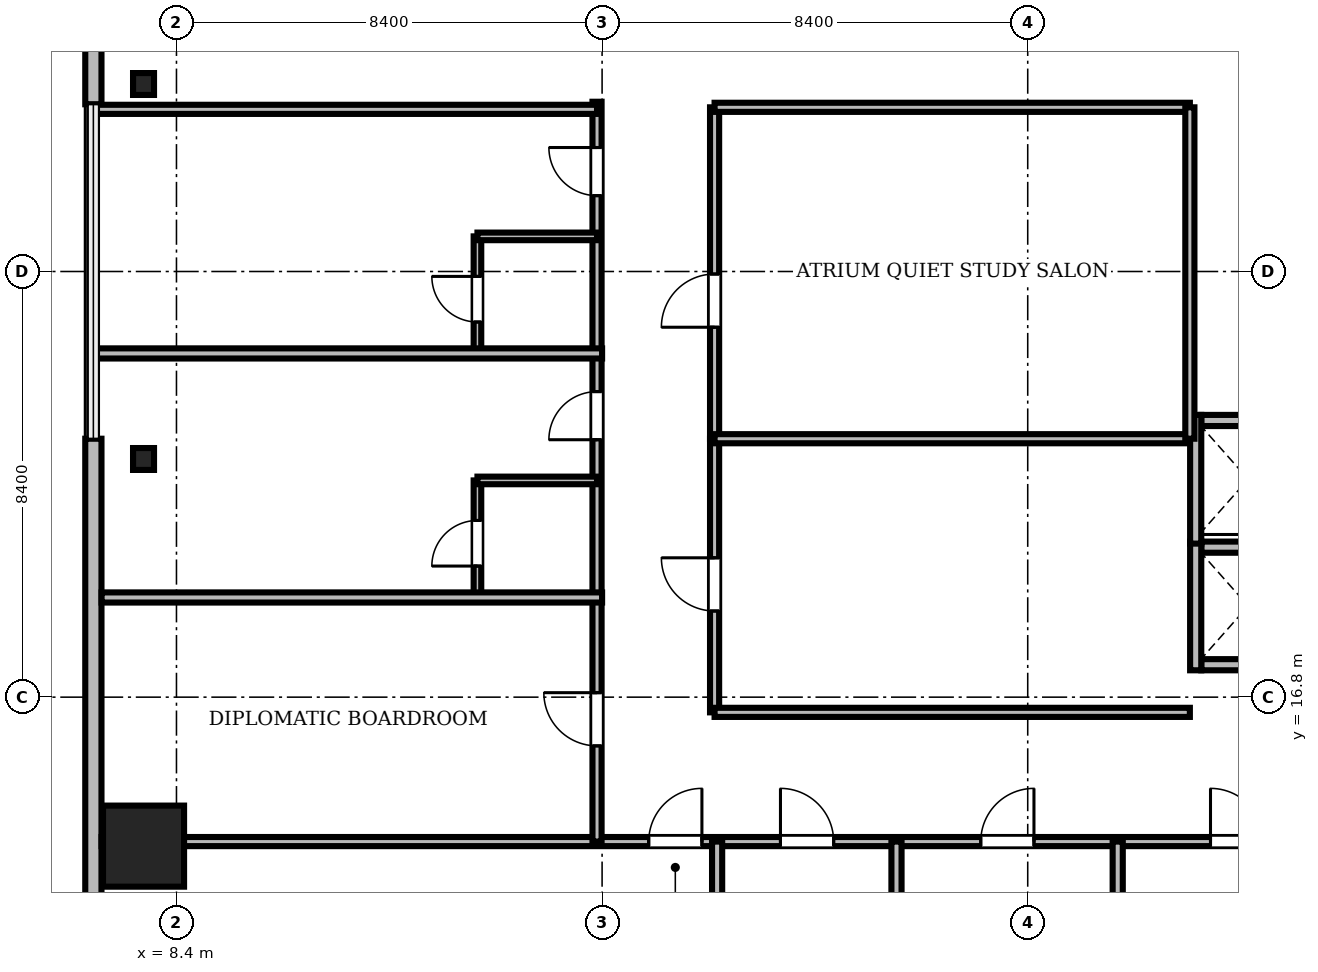
"""IFC4 building model, lengths in metres.
Left out: names, types, materials, properties, quantities, classifications, styles, units other than length and angle.
Written with IfcOpenShell. Run it as: python <this file> out.ifc"""

import sys

from ifc_helpers import new_model, si_unit, direction, frame, frame_2d, origin, origin_2d, place, context, subcontext, project, spatial, rectangle, i_section, extrude, source, transform, mapped, element, fill, save


model = new_model("IFC4")
c1 = context("Model", 3, precision=1e-05, world=origin(), true_north=direction((0.0, 1.0)))
c2 = subcontext(c1, "Body", "Model", "MODEL_VIEW")
j1 = project(units=[si_unit("LENGTHUNIT", "METRE"), si_unit("PLANEANGLEUNIT", "RADIAN")], contexts=[c1])
p1 = place(None, origin())
s1 = spatial("IfcSite", under=j1, at=p1, CompositionType="ELEMENT")
p2 = place(p1, origin())
s2 = spatial("IfcBuilding", under=s1, at=p2, CompositionType="ELEMENT")
p3 = place(p2, frame((0.0, 0.0, 155.7)))
s3 = spatial("IfcBuildingStorey", under=s2, at=p3, CompositionType="ELEMENT", Elevation=155.7)
m1 = source(origin(), c2, "Body", "SweptSolid", [
    extrude(rectangle(XDim=1.6, YDim=1.6, at=origin_2d()), origin(), (0.0, 0.0, 1.0), 3.46),
])
p4 = place(p3, frame((7.75, 13.86, 0.0), z_axis=(0.0, 0.0, 1.0), x_axis=(1.0, 0.0, 0.0)))
e1 = element("IfcColumn", 1, at=p4, inside=s3, PredefinedType="COLUMN", context=c2, shape_type="MappedRepresentation", body=[
    mapped(m1, transform((0.0, 0.0, 0.0), scale=1.0)),
])
m2 = source(origin(), c2, "Body", "SweptSolid", [
    extrude(i_section(OverallWidth=0.414, OverallDepth=0.432, WebThickness=0.026, FlangeThickness=0.04, FilletRadius=0.015, at=origin_2d()), origin(), (0.0, 0.0, 1.0), 3.46),
])
for number, where, z_axis, x_axis in (
    (2, (7.75, 28.9, 0.0), (0.0, 0.0, 1.0), (1.0, 0.0, 0.0)),
    (3, (7.75, 21.5, 0.0), (0.0, 0.0, 1.0), (1.0, 0.0, 0.0)),
):
    element("IfcColumn", number, at=place(p3, frame(where, z_axis=z_axis, x_axis=x_axis)), inside=s3, PredefinedType="COLUMN", context=c2, shape_type="MappedRepresentation", body=[
        mapped(m2, transform((0.0, 0.0, 0.0), scale=1.0)),
    ])
m3 = source(origin(), c2, "Body", "SweptSolid", [
    extrude(rectangle(XDim=15.6, YDim=0.32, at=frame_2d((7.8, 0.0))), origin(), (0.0, 0.0, 1.0), 3.46),
])
p5 = place(p3, frame((6.76, 44.1, 0.0), z_axis=(0.0, 0.0, 1.0), x_axis=(0.0, -1.0, 0.0)))
e4 = element("IfcWall", 4, at=p5, inside=s3, PredefinedType="SOLIDWALL", context=c2, shape_type="MappedRepresentation", body=[
    mapped(m3, transform((0.0, 0.0, 0.0), scale=1.0)),
])
m4 = source(origin(), c2, "Body", "SweptSolid", [
    extrude(rectangle(XDim=1.4, YDim=2.3, at=frame_2d((0.7, 1.15))), frame((0.0, 0.17, 0.0), z_axis=(0.0, -1.0, 0.0), x_axis=(1.0, 0.0, 0.0)), (0.0, 0.0, 1.0), 0.34),
])
p6 = place(p5, frame((9.61, 0.0, 0.0)))
e5 = element("IfcOpeningElement", 5, at=p6, cuts=e4, PredefinedType="OPENING", context=c2, shape_type="MappedRepresentation", body=[
    mapped(m4, transform((0.0, 0.0, 0.0), scale=1.0)),
])
m5 = source(origin(), c2, "Body", "SweptSolid", [
    extrude(rectangle(XDim=2.8, YDim=2.4, at=frame_2d((1.4, 1.2))), frame((0.0, 0.17, 0.0), z_axis=(0.0, -1.0, 0.0), x_axis=(1.0, 0.0, 0.0)), (0.0, 0.0, 1.0), 0.34),
])
p7 = place(p5, frame((2.705, 0.0, 0.72)))
e6 = element("IfcOpeningElement", 6, at=p7, cuts=e4, PredefinedType="OPENING", context=c2, shape_type="MappedRepresentation", body=[
    mapped(m5, transform((0.0, 0.0, 0.0), scale=1.0)),
])
m6 = source(origin(), c2, "Body", "SweptSolid", [
    extrude(rectangle(XDim=15.6, YDim=0.32, at=frame_2d((7.8, 0.0))), origin(), (0.0, 0.0, 1.0), 3.46),
])
p8 = place(p3, frame((6.76, 21.9, 0.0), z_axis=(0.0, 0.0, 1.0), x_axis=(0.0, -1.0, 0.0)))
e7 = element("IfcWall", 7, at=p8, inside=s3, PredefinedType="SOLIDWALL", context=c2, shape_type="MappedRepresentation", body=[
    mapped(m6, transform((0.0, 0.0, 0.0), scale=1.0)),
])
p9 = place(p8, frame((10.095, 0.0, 0.72)))
e8 = element("IfcOpeningElement", 8, at=p9, cuts=e7, PredefinedType="OPENING", context=c2, shape_type="MappedRepresentation", body=[
    mapped(m5, transform((0.0, 0.0, 0.0), scale=1.0)),
])
m7 = source(origin(), c2, "Body", "SweptSolid", [
    extrude(rectangle(XDim=1.85, YDim=0.22, at=frame_2d((0.925, 0.0))), origin(), (0.0, 0.0, 1.0), 3.46),
])
for number, where, z_axis, x_axis in (
    (9, (28.625, 17.44, 0.0), (0.0, 0.0, 1.0), (1.0, 0.0, 0.0)),
    (10, (28.625, 19.76, 0.0), (0.0, 0.0, 1.0), (1.0, 0.0, 0.0)),
):
    element("IfcWall", number, at=place(p3, frame(where, z_axis=z_axis, x_axis=x_axis)), inside=s3, PredefinedType="SOLIDWALL", context=c2, shape_type="MappedRepresentation", body=[
        mapped(m7, transform((0.0, 0.0, 0.0), scale=1.0)),
    ])
m8 = source(origin(), c2, "Body", "SweptSolid", [
    extrude(rectangle(XDim=2.54, YDim=0.22, at=frame_2d((1.27, 0.0))), origin(), (0.0, 0.0, 1.0), 3.46),
])
p10 = place(p3, frame((28.515, 17.33, 0.0), z_axis=(0.0, 0.0, 1.0), x_axis=(0.0, 1.0, 0.0)))
e11 = element("IfcWall", 11, at=p10, inside=s3, PredefinedType="SOLIDWALL", context=c2, shape_type="MappedRepresentation", body=[
    mapped(m8, transform((0.0, 0.0, 0.0), scale=1.0)),
])
p11 = place(p3, frame((28.625, 22.26, 0.0), z_axis=(0.0, 0.0, 1.0), x_axis=(1.0, 0.0, 0.0)))
e12 = element("IfcWall", 12, at=p11, inside=s3, PredefinedType="SOLIDWALL", context=c2, shape_type="MappedRepresentation", body=[
    mapped(m7, transform((0.0, 0.0, 0.0), scale=1.0)),
])
p12 = place(p3, frame((28.515, 19.83, 0.0), z_axis=(0.0, 0.0, 1.0), x_axis=(0.0, 1.0, 0.0)))
e13 = element("IfcWall", 13, at=p12, inside=s3, PredefinedType="SOLIDWALL", context=c2, shape_type="MappedRepresentation", body=[
    mapped(m8, transform((0.0, 0.0, 0.0), scale=1.0)),
])
m9 = source(origin(), c2, "Body", "SweptSolid", [
    extrude(rectangle(XDim=46.156, YDim=0.18, at=frame_2d((23.078, 0.0))), origin(), (0.0, 0.0, 1.0), 2.702),
])
p13 = place(p3, frame((6.922, 13.95, 0.0), z_axis=(0.0, 0.0, 1.0), x_axis=(1.0, 0.0, 0.0)))
e14 = element("IfcWall", 14, at=p13, inside=s3, PredefinedType="PARTITIONING", context=c2, shape_type="MappedRepresentation", body=[
    mapped(m9, transform((0.0, 0.0, 0.0), scale=1.0)),
])
m10 = source(origin(), c2, "Body", "SweptSolid", [
    extrude(rectangle(XDim=1.05, YDim=2.2, at=frame_2d((0.525, 1.1))), frame((0.0, 0.1, 0.0), z_axis=(0.0, -1.0, 0.0), x_axis=(1.0, 0.0, 0.0)), (0.0, 0.0, 1.0), 0.2),
])
p14 = place(p13, frame((10.798, 0.0, 0.0)))
e15 = element("IfcOpeningElement", 15, at=p14, cuts=e14, PredefinedType="OPENING", context=c2, shape_type="MappedRepresentation", body=[
    mapped(m10, transform((0.0, 0.0, 0.0), scale=1.0)),
])
p15 = place(p13, frame((13.398, 0.0, 0.0)))
e16 = element("IfcOpeningElement", 16, at=p15, cuts=e14, PredefinedType="OPENING", context=c2, shape_type="MappedRepresentation", body=[
    mapped(m10, transform((0.0, 0.0, 0.0), scale=1.0)),
])
p16 = place(p13, frame((17.351, 0.0, 0.0)))
e17 = element("IfcOpeningElement", 17, at=p16, cuts=e14, PredefinedType="OPENING", context=c2, shape_type="MappedRepresentation", body=[
    mapped(m10, transform((0.0, 0.0, 0.0), scale=1.0)),
])
p17 = place(p13, frame((21.885, 0.0, 0.0)))
e18 = element("IfcOpeningElement", 18, at=p17, cuts=e14, PredefinedType="OPENING", context=c2, shape_type="MappedRepresentation", body=[
    mapped(m10, transform((0.0, 0.0, 0.0), scale=1.0)),
])
p18 = place(p13, frame((26.588, 0.0, 0.0)))
e19 = element("IfcOpeningElement", 19, at=p18, cuts=e14, PredefinedType="OPENING", context=c2, shape_type="MappedRepresentation", body=[
    mapped(m10, transform((0.0, 0.0, 0.0), scale=1.0)),
])
m11 = source(origin(), c2, "Body", "SweptSolid", [
    extrude(rectangle(XDim=0.95, YDim=2.15, at=frame_2d((0.475, 1.075))), frame((0.0, 0.1, 0.0), z_axis=(0.0, -1.0, 0.0), x_axis=(1.0, 0.0, 0.0)), (0.0, 0.0, 1.0), 0.2),
])
p19 = place(p13, frame((32.516, 0.0, 0.0)))
e20 = element("IfcOpeningElement", 20, at=p19, cuts=e14, PredefinedType="OPENING", context=c2, shape_type="MappedRepresentation", body=[
    mapped(m11, transform((0.0, 0.0, 0.0), scale=1.0)),
])
p20 = place(p13, frame((36.744, 0.0, 0.0)))
e21 = element("IfcOpeningElement", 21, at=p20, cuts=e14, PredefinedType="OPENING", context=c2, shape_type="MappedRepresentation", body=[
    mapped(m10, transform((0.0, 0.0, 0.0), scale=1.0)),
])
p21 = place(p13, frame((41.828, 0.0, 0.0)))
e22 = element("IfcOpeningElement", 22, at=p21, cuts=e14, PredefinedType="OPENING", context=c2, shape_type="MappedRepresentation", body=[
    mapped(m10, transform((0.0, 0.0, 0.0), scale=1.0)),
])
m12 = source(origin(), c2, "Body", "SweptSolid", [
    extrude(rectangle(XDim=14.6, YDim=0.18, at=frame_2d((7.3, 0.0))), origin(), (0.0, 0.0, 1.0), 2.852),
])
p22 = place(p3, frame((16.7, 13.95, 0.0), z_axis=(0.0, 0.0, 1.0), x_axis=(0.0, 1.0, 0.0)))
e23 = element("IfcWall", 23, at=p22, inside=s3, PredefinedType="PARTITIONING", context=c2, shape_type="MappedRepresentation", body=[
    mapped(m12, transform((0.0, 0.0, 0.0), scale=1.0)),
])
p23 = place(p22, frame((1.888, 0.0, 0.0)))
e24 = element("IfcOpeningElement", 24, at=p23, cuts=e23, PredefinedType="OPENING", context=c2, shape_type="MappedRepresentation", body=[
    mapped(m10, transform((0.0, 0.0, 0.0), scale=1.0)),
])
p24 = place(p22, frame((7.93, 0.0, 0.0)))
e25 = element("IfcOpeningElement", 25, at=p24, cuts=e23, PredefinedType="OPENING", context=c2, shape_type="MappedRepresentation", body=[
    mapped(m11, transform((0.0, 0.0, 0.0), scale=1.0)),
])
p25 = place(p22, frame((12.747, 0.0, 0.0)))
e26 = element("IfcOpeningElement", 26, at=p25, cuts=e23, PredefinedType="OPENING", context=c2, shape_type="MappedRepresentation", body=[
    mapped(m11, transform((0.0, 0.0, 0.0), scale=1.0)),
])
m13 = source(origin(), c2, "Body", "SweptSolid", [
    extrude(rectangle(XDim=6.54, YDim=0.18, at=frame_2d((3.27, 0.0))), origin(), (0.0, 0.0, 1.0), 2.852),
])
p26 = place(p3, frame((19.02, 21.9, 0.0), z_axis=(0.0, 0.0, 1.0), x_axis=(0.0, 1.0, 0.0)))
e27 = element("IfcWall", 27, at=p26, inside=s3, PredefinedType="PARTITIONING", context=c2, shape_type="MappedRepresentation", body=[
    mapped(m13, transform((0.0, 0.0, 0.0), scale=1.0)),
])
p27 = place(p26, frame((2.2, 0.0, 0.0)))
e28 = element("IfcOpeningElement", 28, at=p27, cuts=e27, PredefinedType="OPENING", context=c2, shape_type="MappedRepresentation", body=[
    mapped(m10, transform((0.0, 0.0, 0.0), scale=1.0)),
])
m14 = source(origin(), c2, "Body", "SweptSolid", [
    extrude(rectangle(XDim=5.4, YDim=0.18, at=frame_2d((2.7, 0.0))), origin(), (0.0, 0.0, 1.0), 2.852),
])
p28 = place(p3, frame((19.02, 16.5, 0.0), z_axis=(0.0, 0.0, 1.0), x_axis=(0.0, 1.0, 0.0)))
e29 = element("IfcWall", 29, at=p28, inside=s3, PredefinedType="PARTITIONING", context=c2, shape_type="MappedRepresentation", body=[
    mapped(m14, transform((0.0, 0.0, 0.0), scale=1.0)),
])
p29 = place(p28, frame((2.0, 0.0, 0.0)))
e30 = element("IfcOpeningElement", 30, at=p29, cuts=e29, PredefinedType="OPENING", context=c2, shape_type="MappedRepresentation", body=[
    mapped(m10, transform((0.0, 0.0, 0.0), scale=1.0)),
])
m15 = source(origin(), c2, "Body", "SweptSolid", [
    extrude(rectangle(XDim=2.29, YDim=0.15, at=frame_2d((1.145, 0.0))), origin(), (0.0, 0.0, 1.0), 2.852),
])
p30 = place(p3, frame((14.34, 18.787, 0.0), z_axis=(0.0, 0.0, 1.0), x_axis=(0.0, 1.0, 0.0)))
e31 = element("IfcWall", 31, at=p30, inside=s3, PredefinedType="PARTITIONING", context=c2, shape_type="MappedRepresentation", body=[
    mapped(m15, transform((0.0, 0.0, 0.0), scale=1.0)),
])
m16 = source(origin(), c2, "Body", "SweptSolid", [
    extrude(rectangle(XDim=0.9, YDim=2.1, at=frame_2d((0.45, 1.05))), frame((0.0, 0.085, 0.0), z_axis=(0.0, -1.0, 0.0), x_axis=(1.0, 0.0, 0.0)), (0.0, 0.0, 1.0), 0.17),
])
p31 = place(p30, frame((0.6, 0.0, 0.0)))
e32 = element("IfcOpeningElement", 32, at=p31, cuts=e31, PredefinedType="OPENING", context=c2, shape_type="MappedRepresentation", body=[
    mapped(m16, transform((0.0, 0.0, 0.0), scale=1.0)),
])
m17 = source(origin(), c2, "Body", "SweptSolid", [
    extrude(rectangle(XDim=2.29, YDim=0.15, at=frame_2d((1.145, 0.0))), origin(), (0.0, 0.0, 1.0), 3.122),
])
p32 = place(p3, frame((14.34, 23.603, 0.0), z_axis=(0.0, 0.0, 1.0), x_axis=(0.0, 1.0, 0.0)))
e33 = element("IfcWall", 33, at=p32, inside=s3, PredefinedType="PARTITIONING", context=c2, shape_type="MappedRepresentation", body=[
    mapped(m17, transform((0.0, 0.0, 0.0), scale=1.0)),
])
p33 = place(p32, frame((0.6, 0.0, 0.0)))
e34 = element("IfcOpeningElement", 34, at=p33, cuts=e33, PredefinedType="OPENING", context=c2, shape_type="MappedRepresentation", body=[
    mapped(m16, transform((0.0, 0.0, 0.0), scale=1.0)),
])
m18 = source(origin(), c2, "Body", "SweptSolid", [
    extrude(rectangle(XDim=11.828, YDim=0.2, at=frame_2d((5.914, 0.0))), origin(), (0.0, 0.0, 1.0), 2.702),
])
for number, where, z_axis, x_axis in (
    (35, (19.07, 2.122, 0.0), (0.0, 0.0, 1.0), (0.0, 1.0, 0.0)),
    (36, (22.61, 2.122, 0.0), (0.0, 0.0, 1.0), (0.0, 1.0, 0.0)),
):
    element("IfcWall", number, at=place(p3, frame(where, z_axis=z_axis, x_axis=x_axis)), inside=s3, PredefinedType="PARTITIONING", context=c2, shape_type="MappedRepresentation", body=[
        mapped(m18, transform((0.0, 0.0, 0.0), scale=1.0)),
    ])
m19 = source(origin(), c2, "Body", "SweptSolid", [
    extrude(rectangle(XDim=12.02, YDim=0.2, at=frame_2d((6.01, 0.0))), origin(), (0.0, 0.0, 1.0), 2.702),
])
p34 = place(p3, frame((26.976, 1.93, 0.0), z_axis=(0.0, 0.0, 1.0), x_axis=(0.0, 1.0, 0.0)))
e37 = element("IfcWall", 37, at=p34, inside=s3, PredefinedType="PARTITIONING", context=c2, shape_type="MappedRepresentation", body=[
    mapped(m19, transform((0.0, 0.0, 0.0), scale=1.0)),
])
m20 = source(origin(), c2, "Body", "SweptSolid", [
    extrude(rectangle(XDim=9.878, YDim=0.2, at=frame_2d((4.939, 0.0))), origin(), (0.0, 0.0, 1.0), 2.702),
])
p35 = place(p3, frame((6.922, 18.767, 0.0), z_axis=(0.0, 0.0, 1.0), x_axis=(1.0, 0.0, 0.0)))
e38 = element("IfcWall", 38, at=p35, inside=s3, PredefinedType="PARTITIONING", context=c2, shape_type="MappedRepresentation", body=[
    mapped(m20, transform((0.0, 0.0, 0.0), scale=1.0)),
])
m21 = source(origin(), c2, "Body", "SweptSolid", [
    extrude(rectangle(XDim=10.07, YDim=0.2, at=frame_2d((5.035, 0.0))), origin(), (0.0, 0.0, 1.0), 2.702),
])
p36 = place(p3, frame((6.73, 23.583, 0.0), z_axis=(0.0, 0.0, 1.0), x_axis=(1.0, 0.0, 0.0)))
e39 = element("IfcWall", 39, at=p36, inside=s3, PredefinedType="PARTITIONING", context=c2, shape_type="MappedRepresentation", body=[
    mapped(m21, transform((0.0, 0.0, 0.0), scale=1.0)),
])
m22 = source(origin(), c2, "Body", "SweptSolid", [
    extrude(rectangle(XDim=9.97, YDim=0.18, at=frame_2d((4.985, 0.0))), origin(), (0.0, 0.0, 1.0), 2.702),
])
p37 = place(p3, frame((6.73, 28.4, 0.0), z_axis=(0.0, 0.0, 1.0), x_axis=(1.0, 0.0, 0.0)))
e40 = element("IfcWall", 40, at=p37, inside=s3, PredefinedType="PARTITIONING", context=c2, shape_type="MappedRepresentation", body=[
    mapped(m22, transform((0.0, 0.0, 0.0), scale=1.0)),
])
m23 = source(origin(), c2, "Body", "SweptSolid", [
    extrude(rectangle(XDim=9.38, YDim=0.18, at=frame_2d((4.69, 0.0))), origin(), (0.0, 0.0, 1.0), 3.46),
])
for number, where, z_axis, x_axis in (
    (41, (19.02, 16.5, 0.0), (0.0, 0.0, 1.0), (1.0, 0.0, 0.0)),
    (42, (19.02, 21.9, 0.0), (0.0, 0.0, 1.0), (1.0, 0.0, 0.0)),
    (43, (19.02, 28.44, 0.0), (0.0, 0.0, 1.0), (1.0, 0.0, 0.0)),
):
    element("IfcWall", number, at=place(p3, frame(where, z_axis=z_axis, x_axis=x_axis)), inside=s3, PredefinedType="PARTITIONING", context=c2, shape_type="MappedRepresentation", body=[
        mapped(m23, transform((0.0, 0.0, 0.0), scale=1.0)),
    ])
p38 = place(p3, frame((28.4, 21.9, 0.0), z_axis=(0.0, 0.0, 1.0), x_axis=(0.0, 1.0, 0.0)))
e44 = element("IfcWall", 44, at=p38, inside=s3, PredefinedType="PARTITIONING", context=c2, shape_type="MappedRepresentation", body=[
    mapped(m13, transform((0.0, 0.0, 0.0), scale=1.0)),
])
m24 = source(origin(), c2, "Body", "SweptSolid", [
    extrude(rectangle(XDim=2.36, YDim=0.15, at=frame_2d((1.18, 0.0))), origin(), (0.0, 0.0, 1.0), 3.46),
])
for number, where, z_axis, x_axis in (
    (45, (14.34, 21.077, 0.0), (0.0, 0.0, 1.0), (1.0, 0.0, 0.0)),
    (46, (14.34, 25.893, 0.0), (0.0, 0.0, 1.0), (1.0, 0.0, 0.0)),
):
    element("IfcWall", number, at=place(p3, frame(where, z_axis=z_axis, x_axis=x_axis)), inside=s3, PredefinedType="PARTITIONING", context=c2, shape_type="MappedRepresentation", body=[
        mapped(m24, transform((0.0, 0.0, 0.0), scale=1.0)),
    ])
m25 = source(origin(), c2, "Body", "SweptSolid", [
    extrude(rectangle(XDim=1.05, YDim=2.2, at=frame_2d((0.525, 1.1))), frame((0.0, 0.025, 0.0), z_axis=(0.0, -1.0, 0.0), x_axis=(1.0, 0.0, 0.0)), (0.0, 0.0, 1.0), 0.05),
])
p39 = place(p14, origin())
e47 = element("IfcDoor", 47, at=p39, inside=s3, OperationType="SINGLE_SWING_RIGHT", PredefinedType="DOOR", context=c2, shape_type="MappedRepresentation", body=[
    mapped(m25, transform((0.0, 0.0, 0.0), scale=1.0)),
])
fill(e15, e47)
p40 = place(p15, origin())
e48 = element("IfcDoor", 48, at=p40, inside=s3, OperationType="SINGLE_SWING_LEFT", PredefinedType="DOOR", context=c2, shape_type="MappedRepresentation", body=[
    mapped(m25, transform((0.0, 0.0, 0.0), scale=1.0)),
])
fill(e16, e48)
p41 = place(p16, origin())
e49 = element("IfcDoor", 49, at=p41, inside=s3, OperationType="SINGLE_SWING_RIGHT", PredefinedType="DOOR", context=c2, shape_type="MappedRepresentation", body=[
    mapped(m25, transform((0.0, 0.0, 0.0), scale=1.0)),
])
fill(e17, e49)
p42 = place(p17, origin())
e50 = element("IfcDoor", 50, at=p42, inside=s3, OperationType="SINGLE_SWING_LEFT", PredefinedType="DOOR", context=c2, shape_type="MappedRepresentation", body=[
    mapped(m25, transform((0.0, 0.0, 0.0), scale=1.0)),
])
fill(e18, e50)
p43 = place(p23, origin())
e51 = element("IfcDoor", 51, at=p43, inside=s3, OperationType="SINGLE_SWING_RIGHT", PredefinedType="DOOR", context=c2, shape_type="MappedRepresentation", body=[
    mapped(m25, transform((0.0, 0.0, 0.0), scale=1.0)),
])
fill(e24, e51)
m26 = source(origin(), c2, "Body", "SweptSolid", [
    extrude(rectangle(XDim=0.95, YDim=2.15, at=frame_2d((0.475, 1.075))), frame((0.0, 0.025, 0.0), z_axis=(0.0, -1.0, 0.0), x_axis=(1.0, 0.0, 0.0)), (0.0, 0.0, 1.0), 0.05),
])
p44 = place(p24, origin())
e52 = element("IfcDoor", 52, at=p44, inside=s3, OperationType="SINGLE_SWING_LEFT", PredefinedType="DOOR", context=c2, shape_type="MappedRepresentation", body=[
    mapped(m26, transform((0.0, 0.0, 0.0), scale=1.0)),
])
fill(e25, e52)
p45 = place(p25, origin())
e53 = element("IfcDoor", 53, at=p45, inside=s3, OperationType="SINGLE_SWING_RIGHT", PredefinedType="DOOR", context=c2, shape_type="MappedRepresentation", body=[
    mapped(m26, transform((0.0, 0.0, 0.0), scale=1.0)),
])
fill(e26, e53)
p46 = place(p27, origin())
e54 = element("IfcDoor", 54, at=p46, inside=s3, OperationType="SINGLE_SWING_LEFT", PredefinedType="DOOR", context=c2, shape_type="MappedRepresentation", body=[
    mapped(m25, transform((0.0, 0.0, 0.0), scale=1.0)),
])
fill(e28, e54)
p47 = place(p29, origin())
e55 = element("IfcDoor", 55, at=p47, inside=s3, OperationType="SINGLE_SWING_RIGHT", PredefinedType="DOOR", context=c2, shape_type="MappedRepresentation", body=[
    mapped(m25, transform((0.0, 0.0, 0.0), scale=1.0)),
])
fill(e30, e55)
m27 = source(origin(), c2, "Body", "SweptSolid", [
    extrude(rectangle(XDim=0.9, YDim=2.1, at=frame_2d((0.45, 1.05))), frame((0.0, 0.025, 0.0), z_axis=(0.0, -1.0, 0.0), x_axis=(1.0, 0.0, 0.0)), (0.0, 0.0, 1.0), 0.05),
])
p48 = place(p31, origin())
e56 = element("IfcDoor", 56, at=p48, inside=s3, OperationType="SINGLE_SWING_LEFT", PredefinedType="DOOR", context=c2, shape_type="MappedRepresentation", body=[
    mapped(m27, transform((0.0, 0.0, 0.0), scale=1.0)),
])
fill(e32, e56)
p49 = place(p33, origin())
e57 = element("IfcDoor", 57, at=p49, inside=s3, OperationType="SINGLE_SWING_RIGHT", PredefinedType="DOOR", context=c2, shape_type="MappedRepresentation", body=[
    mapped(m27, transform((0.0, 0.0, 0.0), scale=1.0)),
])
fill(e34, e57)
save(model, sys.argv[1])
